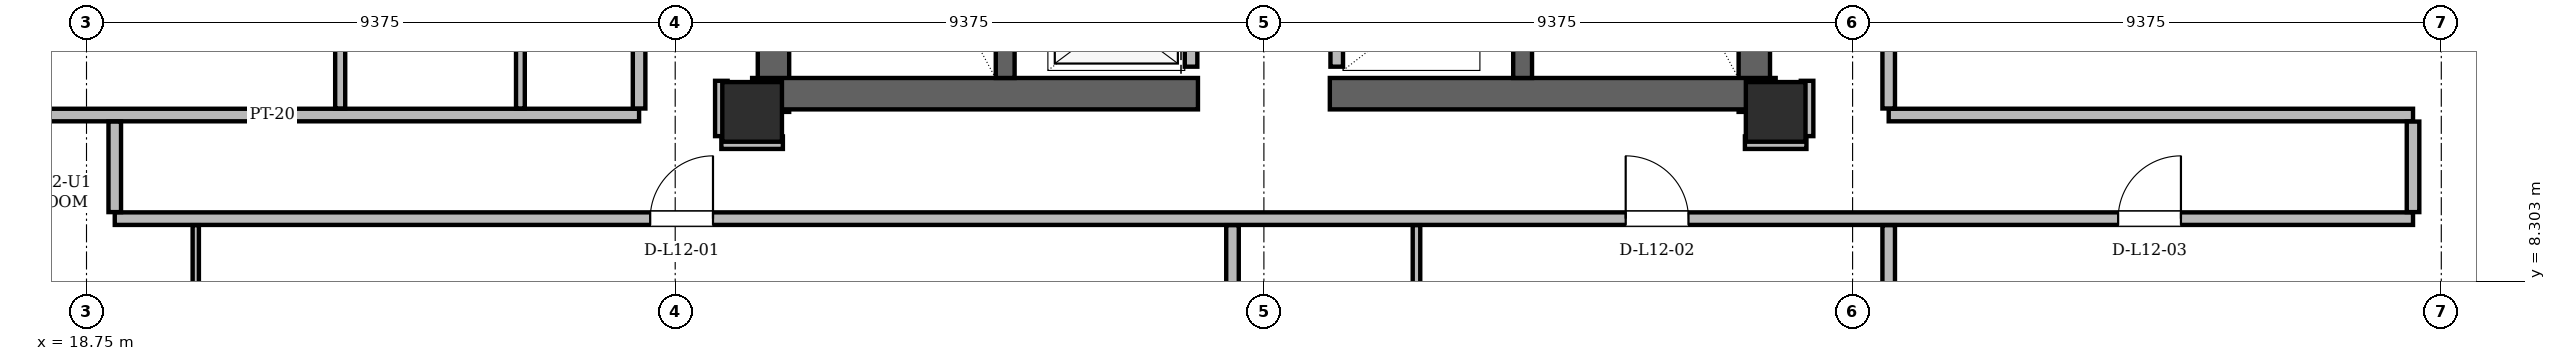
"""IFC4 building model, lengths in metres.
Left out: names, types, materials, properties, quantities, classifications, styles, units other than length and angle.
Written with IfcOpenShell. Run it as: python <this file> out.ifc"""

import sys

from ifc_helpers import new_model, si_unit, direction, frame, frame_2d, origin, origin_2d, place, context, subcontext, project, spatial, rectangle, hollow_rectangle, extrude, element, fill, save


model = new_model("IFC4")
c1 = context("Model", 3, precision=1e-05, world=origin(), true_north=direction((0.0, 1.0)))
c2 = subcontext(c1, "Body", "Model", "MODEL_VIEW")
j1 = project(units=[si_unit("LENGTHUNIT", "METRE"), si_unit("PLANEANGLEUNIT", "RADIAN")], contexts=[c1])
p1 = place(None, origin())
s1 = spatial("IfcSite", under=j1, at=p1, CompositionType="ELEMENT")
p2 = place(p1, origin())
s2 = spatial("IfcBuilding", under=s1, at=p2, CompositionType="ELEMENT")
p3 = place(p2, frame((0.0, 0.0, 48.9)))
s3 = spatial("IfcBuildingStorey", under=s2, at=p3, CompositionType="ELEMENT", Elevation=48.9)
for number, where, z_axis, x_axis in (
    (1, (29.35, 11.0, 0.0), (0.0, 0.0, 1.0), (1.0, 0.0, 0.0)),
    (2, (45.65, 11.0, 0.0), (0.0, 0.0, 1.0), (1.0, 0.0, 0.0)),
):
    element("IfcColumn", number, at=place(p3, frame(where, z_axis=z_axis, x_axis=x_axis)), inside=s3, PredefinedType="COLUMN", context=c2, shape_type="SweptSolid", body=[
        extrude(hollow_rectangle(XDim=0.95, YDim=0.95, WallThickness=0.08, at=origin_2d()), origin(), (0.0, 0.0, 1.0), 3.6),
    ])
for number, where, z_axis, x_axis in (
    (3, (29.69, 11.0, 0.0), (0.0, 0.0, 1.0), (0.0, 1.0, 0.0)),
    (4, (45.31, 11.0, 0.0), (0.0, 0.0, 1.0), (0.0, 1.0, 0.0)),
):
    element("IfcWall", number, at=place(p3, frame(where, z_axis=z_axis, x_axis=x_axis)), inside=s3, PredefinedType="SHEAR", context=c2, shape_type="SweptSolid", body=[
        extrude(rectangle(XDim=13.3, YDim=0.5, at=frame_2d((6.65, 0.0))), origin(), (0.0, 0.0, 1.0), 3.36),
    ])
for number, where, z_axis, x_axis in (
    (5, (29.35, 11.29, 0.0), (0.0, 0.0, 1.0), (1.0, 0.0, 0.0)),
    (6, (38.55, 11.29, 0.0), (0.0, 0.0, 1.0), (1.0, 0.0, 0.0)),
):
    element("IfcWall", number, at=place(p3, frame(where, z_axis=z_axis, x_axis=x_axis)), inside=s3, PredefinedType="SHEAR", context=c2, shape_type="SweptSolid", body=[
        extrude(rectangle(XDim=7.1, YDim=0.5, at=frame_2d((3.55, 0.0))), origin(), (0.0, 0.0, 1.0), 3.36),
    ])
for number, where, z_axis, x_axis in (
    (7, (33.38, 11.54, 0.0), (0.0, 0.0, 1.0), (0.0, 1.0, 0.0)),
    (8, (41.62, 11.54, 0.0), (0.0, 0.0, 1.0), (0.0, 1.0, 0.0)),
):
    element("IfcWall", number, at=place(p3, frame(where, z_axis=z_axis, x_axis=x_axis)), inside=s3, PredefinedType="SHEAR", context=c2, shape_type="SweptSolid", body=[
        extrude(rectangle(XDim=7.62, YDim=0.3, at=frame_2d((3.81, 0.0))), origin(), (0.0, 0.0, 1.0), 3.36),
    ])
p4 = place(p3, frame((13.479, 14.738, 0.0), z_axis=(0.0, 0.0, 1.0), x_axis=(0.499999290135, -0.866025813625, 0.0)))
e9 = element("IfcWall", 9, at=p4, inside=s3, PredefinedType="SOLIDWALL", context=c2, shape_type="SweptSolid", body=[
    extrude(rectangle(XDim=14.733, YDim=0.34, at=frame_2d((7.367, 0.0))), origin(), (0.0, 0.0, 1.0), 2.494),
])
p5 = place(p4, frame((1.251, 0.0, 1.28)))
e10 = element("IfcOpeningElement", 10, at=p5, cuts=e9, PredefinedType="OPENING", context=c2, shape_type="SweptSolid", body=[
    extrude(rectangle(XDim=0.85, YDim=0.92, at=frame_2d((0.425, 0.46))), frame((0.0, 0.17, 0.0), z_axis=(0.0, -1.0, 0.0), x_axis=(1.0, 0.0, 0.0)), (0.0, 0.0, 1.0), 0.34),
])
p6 = place(p3, frame((54.154, 1.978, 0.0), z_axis=(0.0, 0.0, 1.0), x_axis=(0.499999290135, 0.866025813625, 0.0)))
e11 = element("IfcWall", 11, at=p6, inside=s3, PredefinedType="SOLIDWALL", context=c2, shape_type="SweptSolid", body=[
    extrude(rectangle(XDim=14.733, YDim=0.34, at=frame_2d((7.367, 0.0))), origin(), (0.0, 0.0, 1.0), 2.494),
])
p7 = place(p3, frame((36.34, 11.72, 0.0), z_axis=(0.0, 0.0, 1.0), x_axis=(0.0, 1.0, 0.0)))
e12 = element("IfcWall", 12, at=p7, inside=s3, PredefinedType="PARTITIONING", context=c2, shape_type="SweptSolid", body=[
    extrude(rectangle(XDim=7.6, YDim=0.2, at=frame_2d((3.8, 0.0))), origin(), (0.0, 0.0, 1.0), 3.36),
])
p8 = place(p7, frame((0.255, 0.0, 0.0)))
e13 = element("IfcOpeningElement", 13, at=p8, cuts=e12, PredefinedType="OPENING", context=c2, shape_type="SweptSolid", body=[
    extrude(rectangle(XDim=1.05, YDim=2.15, at=frame_2d((0.525, 1.075))), frame((0.0, 0.1, 0.0), z_axis=(0.0, -1.0, 0.0), x_axis=(1.0, 0.0, 0.0)), (0.0, 0.0, 1.0), 0.2),
])
p9 = place(p7, frame((2.105, 0.0, 0.0)))
e14 = element("IfcOpeningElement", 14, at=p9, cuts=e12, PredefinedType="OPENING", context=c2, shape_type="SweptSolid", body=[
    extrude(rectangle(XDim=1.05, YDim=2.15, at=frame_2d((0.525, 1.075))), frame((0.0, 0.1, 0.0), z_axis=(0.0, -1.0, 0.0), x_axis=(1.0, 0.0, 0.0)), (0.0, 0.0, 1.0), 0.2),
])
p10 = place(p7, frame((3.955, 0.0, 0.0)))
e15 = element("IfcOpeningElement", 15, at=p10, cuts=e12, PredefinedType="OPENING", context=c2, shape_type="SweptSolid", body=[
    extrude(rectangle(XDim=1.05, YDim=2.15, at=frame_2d((0.525, 1.075))), frame((0.0, 0.1, 0.0), z_axis=(0.0, -1.0, 0.0), x_axis=(1.0, 0.0, 0.0)), (0.0, 0.0, 1.0), 0.2),
])
p11 = place(p3, frame((38.66, 11.72, 0.0), z_axis=(0.0, 0.0, 1.0), x_axis=(0.0, 1.0, 0.0)))
e16 = element("IfcWall", 16, at=p11, inside=s3, PredefinedType="PARTITIONING", context=c2, shape_type="SweptSolid", body=[
    extrude(rectangle(XDim=9.1, YDim=0.2, at=frame_2d((4.55, 0.0))), origin(), (0.0, 0.0, 1.0), 3.36),
])
p12 = place(p3, frame((19.2, 9.3, 0.0), z_axis=(0.0, 0.0, 1.0), x_axis=(1.0, 0.0, 0.0)))
e17 = element("IfcWall", 17, at=p12, inside=s3, PredefinedType="PARTITIONING", context=c2, shape_type="SweptSolid", body=[
    extrude(rectangle(XDim=36.6, YDim=0.2, at=frame_2d((18.3, 0.0))), origin(), (0.0, 0.0, 1.0), 2.738),
])
p13 = place(p12, frame((8.527, 0.0, 0.0)))
e18 = element("IfcOpeningElement", 18, at=p13, cuts=e17, PredefinedType="OPENING", context=c2, shape_type="SweptSolid", body=[
    extrude(rectangle(XDim=1.0, YDim=2.18, at=frame_2d((0.5, 1.09))), frame((0.0, 0.1, 0.0), z_axis=(0.0, -1.0, 0.0), x_axis=(1.0, 0.0, 0.0)), (0.0, 0.0, 1.0), 0.2),
])
p14 = place(p12, frame((24.062, 0.0, 0.0)))
e19 = element("IfcOpeningElement", 19, at=p14, cuts=e17, PredefinedType="OPENING", context=c2, shape_type="SweptSolid", body=[
    extrude(rectangle(XDim=1.0, YDim=2.18, at=frame_2d((0.5, 1.09))), frame((0.0, 0.1, 0.0), z_axis=(0.0, -1.0, 0.0), x_axis=(1.0, 0.0, 0.0)), (0.0, 0.0, 1.0), 0.2),
])
p15 = place(p12, frame((31.904, 0.0, 0.0)))
e20 = element("IfcOpeningElement", 20, at=p15, cuts=e17, PredefinedType="OPENING", context=c2, shape_type="SweptSolid", body=[
    extrude(rectangle(XDim=1.0, YDim=2.18, at=frame_2d((0.5, 1.09))), frame((0.0, 0.1, 0.0), z_axis=(0.0, -1.0, 0.0), x_axis=(1.0, 0.0, 0.0)), (0.0, 0.0, 1.0), 0.2),
])
for number, where, z_axis, x_axis in (
    (21, (28.86, 10.51, 0.0), (0.0, 0.0, 1.0), (1.0, 0.0, 0.0)),
    (22, (45.16, 10.51, 0.0), (0.0, 0.0, 1.0), (1.0, 0.0, 0.0)),
):
    element("IfcWall", number, at=place(p3, frame(where, z_axis=z_axis, x_axis=x_axis)), inside=s3, PredefinedType="PARTITIONING", context=c2, shape_type="SweptSolid", body=[
        extrude(rectangle(XDim=0.98, YDim=0.2, at=frame_2d((0.49, 0.0))), origin(), (0.0, 0.0, 1.0), 2.738),
    ])
p16 = place(p3, frame((15.867, 10.95, 0.0), z_axis=(0.0, 0.0, 1.0), x_axis=(1.0, 0.0, 0.0)))
e23 = element("IfcWall", 23, at=p16, inside=s3, PredefinedType="PARTITIONING", context=c2, shape_type="SweptSolid", body=[
    extrude(rectangle(XDim=11.683, YDim=0.2, at=frame_2d((5.842, 0.0))), origin(), (0.0, 0.0, 1.0), 3.36),
])
p17 = place(p3, frame((47.45, 10.95, 0.0), z_axis=(0.0, 0.0, 1.0), x_axis=(1.0, 0.0, 0.0)))
e24 = element("IfcWall", 24, at=p17, inside=s3, PredefinedType="PARTITIONING", context=c2, shape_type="SweptSolid", body=[
    extrude(rectangle(XDim=8.35, YDim=0.2, at=frame_2d((4.175, 0.0))), origin(), (0.0, 0.0, 1.0), 3.36),
])
p18 = place(p3, frame((19.2, 9.404, 0.0), z_axis=(0.0, 0.0, 1.0), x_axis=(0.0, 1.0, 0.0)))
e25 = element("IfcWall", 25, at=p18, inside=s3, PredefinedType="PARTITIONING", context=c2, shape_type="SweptSolid", body=[
    extrude(rectangle(XDim=1.442, YDim=0.2, at=frame_2d((0.721, 0.0))), origin(), (0.0, 0.0, 1.0), 3.36),
])
p19 = place(p3, frame((20.49, 2.942, 0.0), z_axis=(0.0, 0.0, 1.0), x_axis=(0.0, 1.0, 0.0)))
e26 = element("IfcWall", 26, at=p19, inside=s3, PredefinedType="PARTITIONING", context=c2, shape_type="SweptSolid", body=[
    extrude(rectangle(XDim=6.254, YDim=0.1, at=frame_2d((3.127, 0.0))), origin(), (0.0, 0.0, 1.0), 3.36),
])
p20 = place(p19, frame((2.708, 0.0, 0.0)))
e27 = element("IfcOpeningElement", 27, at=p20, cuts=e26, PredefinedType="OPENING", context=c2, shape_type="SweptSolid", body=[
    extrude(rectangle(XDim=0.88, YDim=2.08, at=frame_2d((0.44, 1.04))), frame((0.0, 0.05, 0.0), z_axis=(0.0, -1.0, 0.0), x_axis=(1.0, 0.0, 0.0)), (0.0, 0.0, 1.0), 0.1),
])
p21 = place(p3, frame((22.79, 11.054, 0.0), z_axis=(0.0, 0.0, 1.0), x_axis=(0.0, 1.0, 0.0)))
e28 = element("IfcWall", 28, at=p21, inside=s3, PredefinedType="PARTITIONING", context=c2, shape_type="SweptSolid", body=[
    extrude(rectangle(XDim=3.562, YDim=0.16, at=frame_2d((1.781, 0.0))), origin(), (0.0, 0.0, 1.0), 2.738),
])
p22 = place(p3, frame((25.66, 11.054, 0.0), z_axis=(0.0, 0.0, 1.0), x_axis=(0.0, 1.0, 0.0)))
e29 = element("IfcWall", 29, at=p22, inside=s3, PredefinedType="PARTITIONING", context=c2, shape_type="SweptSolid", body=[
    extrude(rectangle(XDim=3.562, YDim=0.14, at=frame_2d((1.781, 0.0))), origin(), (0.0, 0.0, 1.0), 2.738),
])
p23 = place(p3, frame((27.55, 11.054, 0.0), z_axis=(0.0, 0.0, 1.0), x_axis=(0.0, 1.0, 0.0)))
e30 = element("IfcWall", 30, at=p23, inside=s3, PredefinedType="PARTITIONING", context=c2, shape_type="SweptSolid", body=[
    extrude(rectangle(XDim=14.812, YDim=0.2, at=frame_2d((7.406, 0.0))), origin(), (0.0, 0.0, 1.0), 2.738),
])
p24 = place(p23, frame((7.932, 0.0, 0.0)))
e31 = element("IfcOpeningElement", 31, at=p24, cuts=e30, PredefinedType="OPENING", context=c2, shape_type="SweptSolid", body=[
    extrude(rectangle(XDim=1.0, YDim=2.18, at=frame_2d((0.5, 1.09))), frame((0.0, 0.1, 0.0), z_axis=(0.0, -1.0, 0.0), x_axis=(1.0, 0.0, 0.0)), (0.0, 0.0, 1.0), 0.2),
])
p25 = place(p3, frame((28.86, 10.614, 0.0), z_axis=(0.0, 0.0, 1.0), x_axis=(0.0, 1.0, 0.0)))
e32 = element("IfcWall", 32, at=p25, inside=s3, PredefinedType="PARTITIONING", context=c2, shape_type="SweptSolid", body=[
    extrude(rectangle(XDim=0.881, YDim=0.2, at=frame_2d((0.44, 0.0))), origin(), (0.0, 0.0, 1.0), 2.738),
])
p26 = place(p3, frame((37.0, 2.072, 0.0), z_axis=(0.0, 0.0, 1.0), x_axis=(0.0, 1.0, 0.0)))
e33 = element("IfcWall", 33, at=p26, inside=s3, PredefinedType="PARTITIONING", context=c2, shape_type="SweptSolid", body=[
    extrude(rectangle(XDim=7.124, YDim=0.2, at=frame_2d((3.562, 0.0))), origin(), (0.0, 0.0, 1.0), 2.494),
])
p27 = place(p3, frame((39.93, 2.152, 0.0), z_axis=(0.0, 0.0, 1.0), x_axis=(0.0, 1.0, 0.0)))
e34 = element("IfcWall", 34, at=p27, inside=s3, PredefinedType="PARTITIONING", context=c2, shape_type="SweptSolid", body=[
    extrude(rectangle(XDim=7.044, YDim=0.12, at=frame_2d((3.522, 0.0))), origin(), (0.0, 0.0, 1.0), 3.36),
])
p28 = place(p27, frame((3.122, 0.0, 0.0)))
e35 = element("IfcOpeningElement", 35, at=p28, cuts=e34, PredefinedType="OPENING", context=c2, shape_type="SweptSolid", body=[
    extrude(rectangle(XDim=0.88, YDim=2.08, at=frame_2d((0.44, 1.04))), frame((0.0, 0.06, 0.0), z_axis=(0.0, -1.0, 0.0), x_axis=(1.0, 0.0, 0.0)), (0.0, 0.0, 1.0), 0.12),
])
p29 = place(p3, frame((46.15, 10.614, 0.0), z_axis=(0.0, 0.0, 1.0), x_axis=(0.0, 1.0, 0.0)))
e36 = element("IfcWall", 36, at=p29, inside=s3, PredefinedType="PARTITIONING", context=c2, shape_type="SweptSolid", body=[
    extrude(rectangle(XDim=0.881, YDim=0.2, at=frame_2d((0.44, 0.0))), origin(), (0.0, 0.0, 1.0), 2.738),
])
p30 = place(p3, frame((47.45, 2.152, 0.0), z_axis=(0.0, 0.0, 1.0), x_axis=(0.0, 1.0, 0.0)))
e37 = element("IfcWall", 37, at=p30, inside=s3, PredefinedType="PARTITIONING", context=c2, shape_type="SweptSolid", body=[
    extrude(rectangle(XDim=7.044, YDim=0.2, at=frame_2d((3.522, 0.0))), origin(), (0.0, 0.0, 1.0), 2.738),
])
p31 = place(p3, frame((47.45, 11.054, 0.0), z_axis=(0.0, 0.0, 1.0), x_axis=(0.0, 1.0, 0.0)))
e38 = element("IfcWall", 38, at=p31, inside=s3, PredefinedType="PARTITIONING", context=c2, shape_type="SweptSolid", body=[
    extrude(rectangle(XDim=27.683, YDim=0.2, at=frame_2d((13.841, 0.0))), origin(), (0.0, 0.0, 1.0), 2.494),
])
p32 = place(p31, frame((10.989, 0.0, 0.0)))
e39 = element("IfcOpeningElement", 39, at=p32, cuts=e38, PredefinedType="OPENING", context=c2, shape_type="SweptSolid", body=[
    extrude(rectangle(XDim=1.0, YDim=2.18, at=frame_2d((0.5, 1.09))), frame((0.0, 0.1, 0.0), z_axis=(0.0, -1.0, 0.0), x_axis=(1.0, 0.0, 0.0)), (0.0, 0.0, 1.0), 0.2),
])
p33 = place(p3, frame((55.8, 9.404, 0.0), z_axis=(0.0, 0.0, 1.0), x_axis=(0.0, 1.0, 0.0)))
e40 = element("IfcWall", 40, at=p33, inside=s3, PredefinedType="PARTITIONING", context=c2, shape_type="SweptSolid", body=[
    extrude(rectangle(XDim=1.442, YDim=0.2, at=frame_2d((0.721, 0.0))), origin(), (0.0, 0.0, 1.0), 3.36),
])
p34 = place(p13, origin())
e41 = element("IfcDoor", 41, at=p34, inside=s3, OperationType="SINGLE_SWING_RIGHT", PredefinedType="DOOR", context=c2, shape_type="SweptSolid", body=[
    extrude(rectangle(XDim=1.0, YDim=2.18, at=frame_2d((0.5, 1.09))), frame((0.0, 0.025, 0.0), z_axis=(0.0, -1.0, 0.0), x_axis=(1.0, 0.0, 0.0)), (0.0, 0.0, 1.0), 0.05),
])
fill(e18, e41)
p35 = place(p14, origin())
e42 = element("IfcDoor", 42, at=p35, inside=s3, OperationType="SINGLE_SWING_LEFT", PredefinedType="DOOR", context=c2, shape_type="SweptSolid", body=[
    extrude(rectangle(XDim=1.0, YDim=2.18, at=frame_2d((0.5, 1.09))), frame((0.0, 0.025, 0.0), z_axis=(0.0, -1.0, 0.0), x_axis=(1.0, 0.0, 0.0)), (0.0, 0.0, 1.0), 0.05),
])
fill(e19, e42)
p36 = place(p15, origin())
e43 = element("IfcDoor", 43, at=p36, inside=s3, OperationType="SINGLE_SWING_RIGHT", PredefinedType="DOOR", context=c2, shape_type="SweptSolid", body=[
    extrude(rectangle(XDim=1.0, YDim=2.18, at=frame_2d((0.5, 1.09))), frame((0.0, 0.025, 0.0), z_axis=(0.0, -1.0, 0.0), x_axis=(1.0, 0.0, 0.0)), (0.0, 0.0, 1.0), 0.05),
])
fill(e20, e43)
save(model, sys.argv[1])
